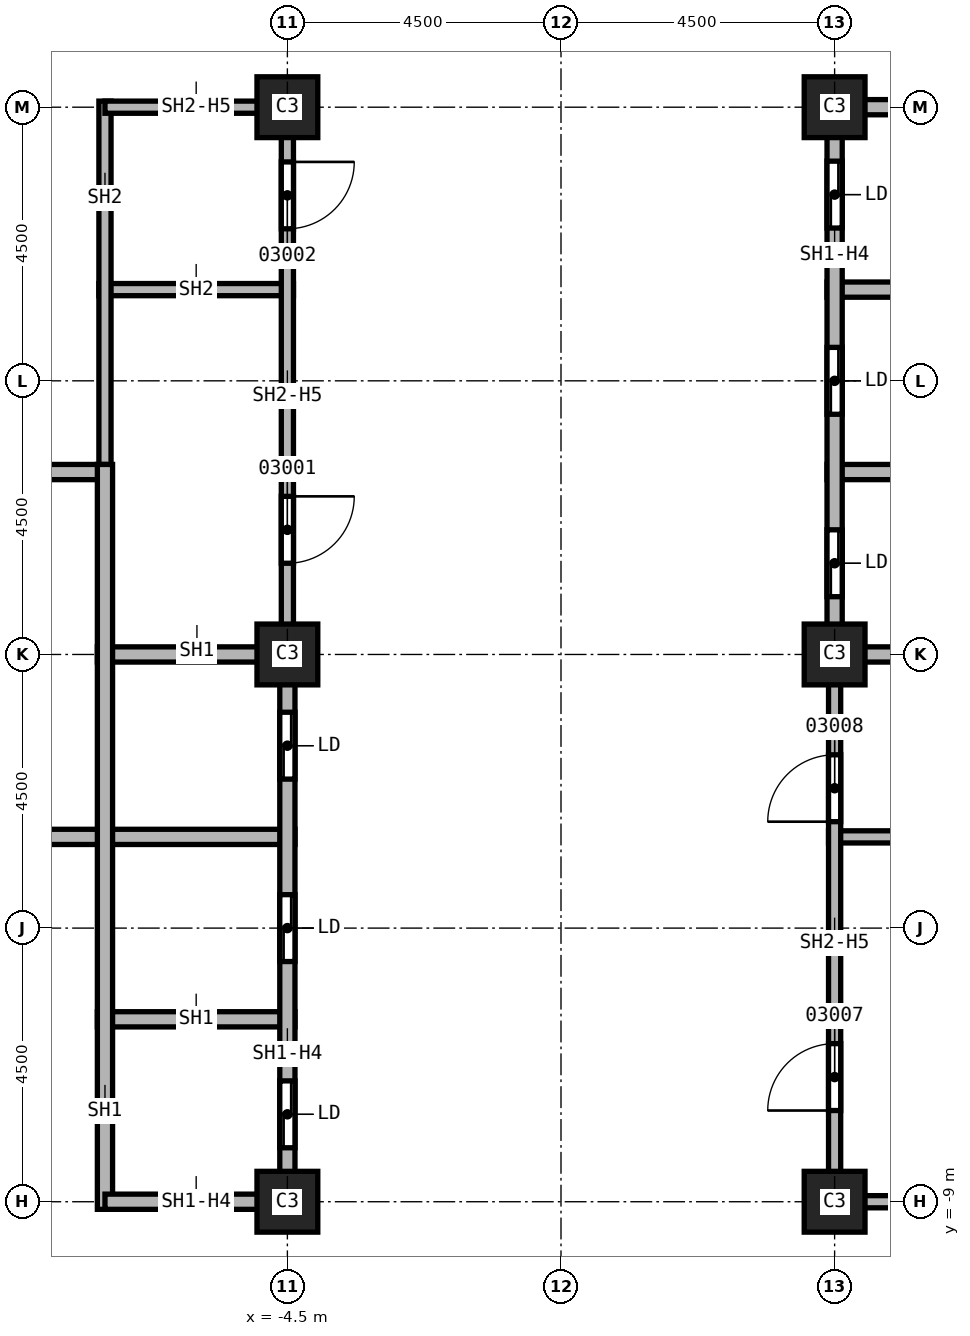
"""IFC4 building model, lengths in metres.
Left out: names, types, materials, properties, quantities, classifications, styles, units other than length and angle.
Written with IfcOpenShell. Run it as: python <this file> out.ifc"""

import sys

from ifc_helpers import new_model, si_unit, direction, frame, frame_2d, origin, origin_2d, place, context, subcontext, project, spatial, rectangle, extrude, element, fill, save


model = new_model("IFC4")
c1 = context("Model", 3, precision=1e-05, world=origin(), true_north=direction((0.0, 1.0)))
c2 = subcontext(c1, "Body", "Model", "MODEL_VIEW")
j1 = project(units=[si_unit("LENGTHUNIT", "METRE"), si_unit("PLANEANGLEUNIT", "RADIAN")], contexts=[c1])
p1 = place(None, origin())
s1 = spatial("IfcSite", under=j1, at=p1, CompositionType="ELEMENT")
p2 = place(p1, origin())
s2 = spatial("IfcBuilding", under=s1, at=p2, CompositionType="ELEMENT")
p3 = place(p2, frame((0.0, 0.0, 92.0)))
s3 = spatial("IfcBuildingStorey", under=s2, at=p3, CompositionType="ELEMENT", Elevation=92.0)
for number, where, z_axis, x_axis in (
    (1, (4.5, 0.0, 0.0), (0.0, 0.0, 1.0), (1.0, 0.0, 0.0)),
    (2, (4.5, 9.0, 0.0), (0.0, 0.0, 1.0), (1.0, 0.0, 0.0)),
    (3, (4.5, -9.0, 0.0), (0.0, 0.0, 1.0), (1.0, 0.0, 0.0)),
    (4, (-4.5, 0.0, 0.0), (0.0, 0.0, 1.0), (1.0, 0.0, 0.0)),
    (5, (-4.5, 9.0, 0.0), (0.0, 0.0, 1.0), (1.0, 0.0, 0.0)),
    (6, (-4.5, -9.0, 0.0), (0.0, 0.0, 1.0), (1.0, 0.0, 0.0)),
):
    element("IfcColumn", number, at=place(p3, frame(where, z_axis=z_axis, x_axis=x_axis)), inside=s3, PredefinedType="COLUMN", context=c2, shape_type="SweptSolid", body=[
        extrude(rectangle(XDim=1.0, YDim=1.0, at=origin_2d()), origin(), (0.0, 0.0, 1.0), 3.7),
    ])
p4 = place(p3, frame((-7.6, 6.0, 0.0), z_axis=(0.0, 0.0, 1.0), x_axis=(1.0, 0.0, 0.0)))
e7 = element("IfcWall", 7, at=p4, inside=s3, PredefinedType="SOLIDWALL", context=c2, shape_type="SweptSolid", body=[
    extrude(rectangle(XDim=3.2, YDim=0.2, at=frame_2d((1.6, 0.0))), origin(), (0.0, 0.0, 1.0), 3.7),
])
p5 = place(p3, frame((-7.5, 2.875, 0.0), z_axis=(0.0, 0.0, 1.0), x_axis=(0.0, 1.0, 0.0)))
e8 = element("IfcWall", 8, at=p5, inside=s3, PredefinedType="SOLIDWALL", context=c2, shape_type="SweptSolid", body=[
    extrude(rectangle(XDim=6.225, YDim=0.2, at=frame_2d((3.113, 0.0))), origin(), (0.0, 0.0, 1.0), 3.7),
])
p6 = place(p3, frame((-7.5, 9.0, 0.0), z_axis=(0.0, 0.0, 1.0), x_axis=(1.0, 0.0, 0.0)))
e9 = element("IfcWall", 9, at=p6, inside=s3, PredefinedType="SOLIDWALL", context=c2, shape_type="SweptSolid", body=[
    extrude(rectangle(XDim=3.0, YDim=0.2, at=frame_2d((1.5, 0.0))), origin(), (0.0, 0.0, 1.0), 2.938),
])
p7 = place(p3, frame((-4.5, 9.1, 0.0), z_axis=(0.0, 0.0, 1.0), x_axis=(0.0, -1.0, 0.0)))
e10 = element("IfcWall", 10, at=p7, inside=s3, PredefinedType="SOLIDWALL", context=c2, shape_type="SweptSolid", body=[
    extrude(rectangle(XDim=9.1, YDim=0.2, at=frame_2d((4.55, 0.0))), origin(), (0.0, 0.0, 1.0), 2.938),
])
p8 = place(p7, frame((6.5, 0.0, 0.0)))
e11 = element("IfcOpeningElement", 11, at=p8, cuts=e10, PredefinedType="OPENING", context=c2, shape_type="SweptSolid", body=[
    extrude(rectangle(XDim=1.1, YDim=2.1, at=frame_2d((0.55, 1.05))), frame((0.0, 0.1, 0.0), z_axis=(0.0, -1.0, 0.0), x_axis=(1.0, 0.0, 0.0)), (0.0, 0.0, 1.0), 0.2),
])
p9 = place(p7, frame((1.0, 0.0, 0.0)))
e12 = element("IfcOpeningElement", 12, at=p9, cuts=e10, PredefinedType="OPENING", context=c2, shape_type="SweptSolid", body=[
    extrude(rectangle(XDim=1.1, YDim=2.1, at=frame_2d((0.55, 1.05))), frame((0.0, 0.1, 0.0), z_axis=(0.0, -1.0, 0.0), x_axis=(1.0, 0.0, 0.0)), (0.0, 0.0, 1.0), 0.2),
])
p10 = place(p3, frame((4.4, -3.0, 0.0), z_axis=(0.0, 0.0, 1.0), x_axis=(1.0, 0.0, 0.0)))
e13 = element("IfcWall", 13, at=p10, inside=s3, PredefinedType="SOLIDWALL", context=c2, shape_type="SweptSolid", body=[
    extrude(rectangle(XDim=3.225, YDim=0.2, at=frame_2d((1.613, 0.0))), origin(), (0.0, 0.0, 1.0), 3.7),
])
p11 = place(p3, frame((4.5, -9.1, 0.0), z_axis=(0.0, 0.0, 1.0), x_axis=(0.0, 1.0, 0.0)))
e14 = element("IfcWall", 14, at=p11, inside=s3, PredefinedType="SOLIDWALL", context=c2, shape_type="SweptSolid", body=[
    extrude(rectangle(XDim=9.1, YDim=0.2, at=frame_2d((4.55, 0.0))), origin(), (0.0, 0.0, 1.0), 2.938),
])
p12 = place(p11, frame((1.6, 0.0, 0.0)))
e15 = element("IfcOpeningElement", 15, at=p12, cuts=e14, PredefinedType="OPENING", context=c2, shape_type="SweptSolid", body=[
    extrude(rectangle(XDim=1.1, YDim=2.1, at=frame_2d((0.55, 1.05))), frame((0.0, 0.1, 0.0), z_axis=(0.0, -1.0, 0.0), x_axis=(1.0, 0.0, 0.0)), (0.0, 0.0, 1.0), 0.2),
])
p13 = place(p11, frame((6.35, 0.0, 0.0)))
e16 = element("IfcOpeningElement", 16, at=p13, cuts=e14, PredefinedType="OPENING", context=c2, shape_type="SweptSolid", body=[
    extrude(rectangle(XDim=1.1, YDim=2.1, at=frame_2d((0.55, 1.05))), frame((0.0, 0.1, 0.0), z_axis=(0.0, -1.0, 0.0), x_axis=(1.0, 0.0, 0.0)), (0.0, 0.0, 1.0), 0.2),
])
p14 = place(p3, frame((7.5, -9.0, 0.0), z_axis=(0.0, 0.0, 1.0), x_axis=(-1.0, 0.0, 0.0)))
e17 = element("IfcWall", 17, at=p14, inside=s3, PredefinedType="SOLIDWALL", context=c2, shape_type="SweptSolid", body=[
    extrude(rectangle(XDim=3.0, YDim=0.2, at=frame_2d((1.5, 0.0))), origin(), (0.0, 0.0, 1.0), 2.938),
])
p15 = place(p3, frame((-13.625, 3.0, 0.0), z_axis=(0.0, 0.0, 1.0), x_axis=(1.0, 0.0, 0.0)))
e18 = element("IfcWall", 18, at=p15, inside=s3, PredefinedType="SOLIDWALL", context=c2, shape_type="SweptSolid", body=[
    extrude(rectangle(XDim=6.125, YDim=0.25, at=frame_2d((3.062, 0.0))), origin(), (0.0, 0.0, 1.0), 3.7),
])
p16 = place(p15, frame((3.25, 0.0, 0.0)))
e19 = element("IfcOpeningElement", 19, at=p16, cuts=e18, PredefinedType="OPENING", context=c2, shape_type="SweptSolid", body=[
    extrude(rectangle(XDim=1.1, YDim=2.1, at=frame_2d((0.55, 1.05))), frame((0.0, 0.125, 0.0), z_axis=(0.0, -1.0, 0.0), x_axis=(1.0, 0.0, 0.0)), (0.0, 0.0, 1.0), 0.25),
])
p17 = place(p3, frame((-13.625, -3.0, 0.0), z_axis=(0.0, 0.0, 1.0), x_axis=(1.0, 0.0, 0.0)))
e20 = element("IfcWall", 20, at=p17, inside=s3, PredefinedType="SOLIDWALL", context=c2, shape_type="SweptSolid", body=[
    extrude(rectangle(XDim=9.25, YDim=0.25, at=frame_2d((4.625, 0.0))), origin(), (0.0, 0.0, 1.0), 3.7),
])
p18 = place(p17, frame((3.25, 0.0, 0.0)))
e21 = element("IfcOpeningElement", 21, at=p18, cuts=e20, PredefinedType="OPENING", context=c2, shape_type="SweptSolid", body=[
    extrude(rectangle(XDim=1.1, YDim=2.1, at=frame_2d((0.55, 1.05))), frame((0.0, 0.125, 0.0), z_axis=(0.0, -1.0, 0.0), x_axis=(1.0, 0.0, 0.0)), (0.0, 0.0, 1.0), 0.25),
])
for number, where, z_axis, x_axis in (
    (22, (-7.625, -6.0, 0.0), (0.0, 0.0, 1.0), (1.0, 0.0, 0.0)),
    (23, (-7.625, 0.0, 0.0), (0.0, 0.0, 1.0), (1.0, 0.0, 0.0)),
):
    element("IfcWall", number, at=place(p3, frame(where, z_axis=z_axis, x_axis=x_axis)), inside=s3, PredefinedType="SOLIDWALL", context=c2, shape_type="SweptSolid", body=[
        extrude(rectangle(XDim=3.25, YDim=0.25, at=frame_2d((1.625, 0.0))), origin(), (0.0, 0.0, 1.0), 3.7),
    ])
p19 = place(p3, frame((-7.5, -9.125, 0.0), z_axis=(0.0, 0.0, 1.0), x_axis=(0.0, 1.0, 0.0)))
e24 = element("IfcWall", 24, at=p19, inside=s3, PredefinedType="SOLIDWALL", context=c2, shape_type="SweptSolid", body=[
    extrude(rectangle(XDim=12.25, YDim=0.25, at=frame_2d((6.125, 0.0))), origin(), (0.0, 0.0, 1.0), 3.7),
])
p20 = place(p3, frame((-4.5, -9.0, 0.0), z_axis=(0.0, 0.0, 1.0), x_axis=(-1.0, 0.0, 0.0)))
e25 = element("IfcWall", 25, at=p20, inside=s3, PredefinedType="SOLIDWALL", context=c2, shape_type="SweptSolid", body=[
    extrude(rectangle(XDim=3.0, YDim=0.25, at=frame_2d((1.5, 0.0))), origin(), (0.0, 0.0, 1.0), 2.938),
])
p21 = place(p3, frame((-4.5, 0.0, 0.0), z_axis=(0.0, 0.0, 1.0), x_axis=(0.0, -1.0, 0.0)))
e26 = element("IfcWall", 26, at=p21, inside=s3, PredefinedType="SOLIDWALL", context=c2, shape_type="SweptSolid", body=[
    extrude(rectangle(XDim=9.125, YDim=0.25, at=frame_2d((4.562, 0.0))), origin(), (0.0, 0.0, 1.0), 2.938),
])
p22 = place(p21, frame((7.012, 0.0, 0.0)))
e27 = element("IfcOpeningElement", 27, at=p22, cuts=e26, PredefinedType="OPENING", context=c2, shape_type="SweptSolid", body=[
    extrude(rectangle(XDim=1.1, YDim=2.1, at=frame_2d((0.55, 1.05))), frame((0.0, 0.125, 0.0), z_axis=(0.0, -1.0, 0.0), x_axis=(1.0, 0.0, 0.0)), (0.0, 0.0, 1.0), 0.25),
])
p23 = place(p21, frame((3.95, 0.0, 0.0)))
e28 = element("IfcOpeningElement", 28, at=p23, cuts=e26, PredefinedType="OPENING", context=c2, shape_type="SweptSolid", body=[
    extrude(rectangle(XDim=1.1, YDim=2.1, at=frame_2d((0.55, 1.05))), frame((0.0, 0.125, 0.0), z_axis=(0.0, -1.0, 0.0), x_axis=(1.0, 0.0, 0.0)), (0.0, 0.0, 1.0), 0.25),
])
p24 = place(p21, frame((0.95, 0.0, 0.0)))
e29 = element("IfcOpeningElement", 29, at=p24, cuts=e26, PredefinedType="OPENING", context=c2, shape_type="SweptSolid", body=[
    extrude(rectangle(XDim=1.1, YDim=2.1, at=frame_2d((0.55, 1.05))), frame((0.0, 0.125, 0.0), z_axis=(0.0, -1.0, 0.0), x_axis=(1.0, 0.0, 0.0)), (0.0, 0.0, 1.0), 0.25),
])
p25 = place(p3, frame((4.375, 0.0, 0.0), z_axis=(0.0, 0.0, 1.0), x_axis=(1.0, 0.0, 0.0)))
e30 = element("IfcWall", 30, at=p25, inside=s3, PredefinedType="SOLIDWALL", context=c2, shape_type="SweptSolid", body=[
    extrude(rectangle(XDim=3.25, YDim=0.25, at=frame_2d((1.625, 0.0))), origin(), (0.0, 0.0, 1.0), 3.7),
])
p26 = place(p3, frame((4.375, 3.0, 0.0), z_axis=(0.0, 0.0, 1.0), x_axis=(1.0, 0.0, 0.0)))
e31 = element("IfcWall", 31, at=p26, inside=s3, PredefinedType="SOLIDWALL", context=c2, shape_type="SweptSolid", body=[
    extrude(rectangle(XDim=9.25, YDim=0.25, at=frame_2d((4.625, 0.0))), origin(), (0.0, 0.0, 1.0), 3.7),
])
p27 = place(p26, frame((4.125, 0.0, 0.0)))
e32 = element("IfcOpeningElement", 32, at=p27, cuts=e31, PredefinedType="OPENING", context=c2, shape_type="SweptSolid", body=[
    extrude(rectangle(XDim=1.1, YDim=2.1, at=frame_2d((0.55, 1.05))), frame((0.0, 0.125, 0.0), z_axis=(0.0, -1.0, 0.0), x_axis=(1.0, 0.0, 0.0)), (0.0, 0.0, 1.0), 0.25),
])
p28 = place(p3, frame((4.375, 6.0, 0.0), z_axis=(0.0, 0.0, 1.0), x_axis=(1.0, 0.0, 0.0)))
e33 = element("IfcWall", 33, at=p28, inside=s3, PredefinedType="SOLIDWALL", context=c2, shape_type="SweptSolid", body=[
    extrude(rectangle(XDim=3.25, YDim=0.25, at=frame_2d((1.625, 0.0))), origin(), (0.0, 0.0, 1.0), 3.7),
])
p29 = place(p3, frame((4.5, 0.0, 0.0), z_axis=(0.0, 0.0, 1.0), x_axis=(0.0, 1.0, 0.0)))
e34 = element("IfcWall", 34, at=p29, inside=s3, PredefinedType="SOLIDWALL", context=c2, shape_type="SweptSolid", body=[
    extrude(rectangle(XDim=9.125, YDim=0.25, at=frame_2d((4.562, 0.0))), origin(), (0.0, 0.0, 1.0), 2.938),
])
p30 = place(p29, frame((0.95, 0.0, 0.0)))
e35 = element("IfcOpeningElement", 35, at=p30, cuts=e34, PredefinedType="OPENING", context=c2, shape_type="SweptSolid", body=[
    extrude(rectangle(XDim=1.1, YDim=2.1, at=frame_2d((0.55, 1.05))), frame((0.0, 0.125, 0.0), z_axis=(0.0, -1.0, 0.0), x_axis=(1.0, 0.0, 0.0)), (0.0, 0.0, 1.0), 0.25),
])
p31 = place(p29, frame((3.95, 0.0, 0.0)))
e36 = element("IfcOpeningElement", 36, at=p31, cuts=e34, PredefinedType="OPENING", context=c2, shape_type="SweptSolid", body=[
    extrude(rectangle(XDim=1.1, YDim=2.1, at=frame_2d((0.55, 1.05))), frame((0.0, 0.125, 0.0), z_axis=(0.0, -1.0, 0.0), x_axis=(1.0, 0.0, 0.0)), (0.0, 0.0, 1.0), 0.25),
])
p32 = place(p29, frame((7.012, 0.0, 0.0)))
e37 = element("IfcOpeningElement", 37, at=p32, cuts=e34, PredefinedType="OPENING", context=c2, shape_type="SweptSolid", body=[
    extrude(rectangle(XDim=1.1, YDim=2.1, at=frame_2d((0.55, 1.05))), frame((0.0, 0.125, 0.0), z_axis=(0.0, -1.0, 0.0), x_axis=(1.0, 0.0, 0.0)), (0.0, 0.0, 1.0), 0.25),
])
p33 = place(p3, frame((4.5, 9.0, 0.0), z_axis=(0.0, 0.0, 1.0), x_axis=(1.0, 0.0, 0.0)))
e38 = element("IfcWall", 38, at=p33, inside=s3, PredefinedType="SOLIDWALL", context=c2, shape_type="SweptSolid", body=[
    extrude(rectangle(XDim=3.0, YDim=0.25, at=frame_2d((1.5, 0.0))), origin(), (0.0, 0.0, 1.0), 2.938),
])
p34 = place(p8, origin())
e39 = element("IfcDoor", 39, at=p34, inside=s3, OperationType="SINGLE_SWING_RIGHT", PredefinedType="DOOR", context=c2, shape_type="SweptSolid", body=[
    extrude(rectangle(XDim=1.1, YDim=2.1, at=frame_2d((0.55, 1.05))), frame((0.0, 0.025, 0.0), z_axis=(0.0, -1.0, 0.0), x_axis=(1.0, 0.0, 0.0)), (0.0, 0.0, 1.0), 0.05),
])
fill(e11, e39)
p35 = place(p9, origin())
e40 = element("IfcDoor", 40, at=p35, inside=s3, OperationType="SINGLE_SWING_LEFT", PredefinedType="DOOR", context=c2, shape_type="SweptSolid", body=[
    extrude(rectangle(XDim=1.1, YDim=2.1, at=frame_2d((0.55, 1.05))), frame((0.0, 0.025, 0.0), z_axis=(0.0, -1.0, 0.0), x_axis=(1.0, 0.0, 0.0)), (0.0, 0.0, 1.0), 0.05),
])
fill(e12, e40)
p36 = place(p12, origin())
e41 = element("IfcDoor", 41, at=p36, inside=s3, OperationType="SINGLE_SWING_RIGHT", PredefinedType="DOOR", context=c2, shape_type="SweptSolid", body=[
    extrude(rectangle(XDim=1.1, YDim=2.1, at=frame_2d((0.55, 1.05))), frame((0.0, 0.025, 0.0), z_axis=(0.0, -1.0, 0.0), x_axis=(1.0, 0.0, 0.0)), (0.0, 0.0, 1.0), 0.05),
])
fill(e15, e41)
p37 = place(p13, origin())
e42 = element("IfcDoor", 42, at=p37, inside=s3, OperationType="SINGLE_SWING_LEFT", PredefinedType="DOOR", context=c2, shape_type="SweptSolid", body=[
    extrude(rectangle(XDim=1.1, YDim=2.1, at=frame_2d((0.55, 1.05))), frame((0.0, 0.025, 0.0), z_axis=(0.0, -1.0, 0.0), x_axis=(1.0, 0.0, 0.0)), (0.0, 0.0, 1.0), 0.05),
])
fill(e16, e42)
p38 = place(p22, origin())
e43 = element("IfcDoor", 43, at=p38, inside=s3, OperationType="SLIDING_TO_LEFT", PredefinedType="DOOR", context=c2, shape_type="SweptSolid", body=[
    extrude(rectangle(XDim=1.1, YDim=2.1, at=frame_2d((0.55, 1.05))), frame((0.0, 0.025, 0.0), z_axis=(0.0, -1.0, 0.0), x_axis=(1.0, 0.0, 0.0)), (0.0, 0.0, 1.0), 0.05),
])
fill(e27, e43)
p39 = place(p23, origin())
e44 = element("IfcDoor", 44, at=p39, inside=s3, OperationType="SLIDING_TO_LEFT", PredefinedType="DOOR", context=c2, shape_type="SweptSolid", body=[
    extrude(rectangle(XDim=1.1, YDim=2.1, at=frame_2d((0.55, 1.05))), frame((0.0, 0.025, 0.0), z_axis=(0.0, -1.0, 0.0), x_axis=(1.0, 0.0, 0.0)), (0.0, 0.0, 1.0), 0.05),
])
fill(e28, e44)
p40 = place(p24, origin())
e45 = element("IfcDoor", 45, at=p40, inside=s3, OperationType="SLIDING_TO_LEFT", PredefinedType="DOOR", context=c2, shape_type="SweptSolid", body=[
    extrude(rectangle(XDim=1.1, YDim=2.1, at=frame_2d((0.55, 1.05))), frame((0.0, 0.025, 0.0), z_axis=(0.0, -1.0, 0.0), x_axis=(1.0, 0.0, 0.0)), (0.0, 0.0, 1.0), 0.05),
])
fill(e29, e45)
p41 = place(p30, origin())
e46 = element("IfcDoor", 46, at=p41, inside=s3, OperationType="SLIDING_TO_LEFT", PredefinedType="DOOR", context=c2, shape_type="SweptSolid", body=[
    extrude(rectangle(XDim=1.1, YDim=2.1, at=frame_2d((0.55, 1.05))), frame((0.0, 0.025, 0.0), z_axis=(0.0, -1.0, 0.0), x_axis=(1.0, 0.0, 0.0)), (0.0, 0.0, 1.0), 0.05),
])
fill(e35, e46)
p42 = place(p31, origin())
e47 = element("IfcDoor", 47, at=p42, inside=s3, OperationType="SLIDING_TO_LEFT", PredefinedType="DOOR", context=c2, shape_type="SweptSolid", body=[
    extrude(rectangle(XDim=1.1, YDim=2.1, at=frame_2d((0.55, 1.05))), frame((0.0, 0.025, 0.0), z_axis=(0.0, -1.0, 0.0), x_axis=(1.0, 0.0, 0.0)), (0.0, 0.0, 1.0), 0.05),
])
fill(e36, e47)
p43 = place(p32, origin())
e48 = element("IfcDoor", 48, at=p43, inside=s3, OperationType="SLIDING_TO_LEFT", PredefinedType="DOOR", context=c2, shape_type="SweptSolid", body=[
    extrude(rectangle(XDim=1.1, YDim=2.1, at=frame_2d((0.55, 1.05))), frame((0.0, 0.025, 0.0), z_axis=(0.0, -1.0, 0.0), x_axis=(1.0, 0.0, 0.0)), (0.0, 0.0, 1.0), 0.05),
])
fill(e37, e48)
save(model, sys.argv[1])
